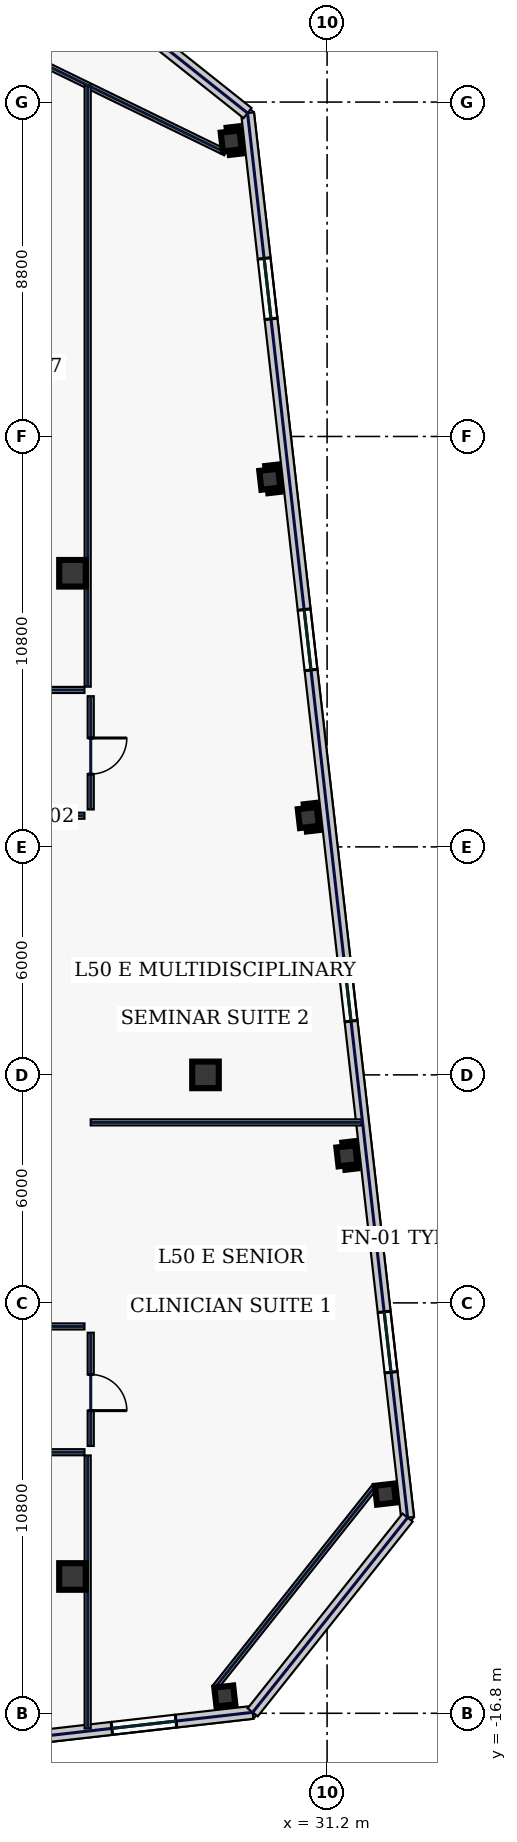
"""IFC4 building model, lengths in metres.
Left out: names, types, materials, properties, quantities, classifications, styles, units other than length and angle.
Written with IfcOpenShell. Run it as: python <this file> out.ifc"""

import sys

from ifc_helpers import new_model, si_unit, direction, frame, frame_2d, origin, origin_2d, place, context, subcontext, project, spatial, rectangle, hollow_rectangle, extrude, element, fill, save


model = new_model("IFC4")
c1 = context("Model", 3, precision=1e-05, world=origin(), true_north=direction((0.0, 1.0)))
c2 = subcontext(c1, "Body", "Model", "MODEL_VIEW")
j1 = project(units=[si_unit("LENGTHUNIT", "METRE"), si_unit("PLANEANGLEUNIT", "RADIAN")], contexts=[c1])
p1 = place(None, origin())
s1 = spatial("IfcSite", under=j1, at=p1, CompositionType="ELEMENT")
p2 = place(p1, origin())
s2 = spatial("IfcBuilding", under=s1, at=p2, CompositionType="ELEMENT")
p3 = place(p2, frame((0.0, 0.0, 218.2)))
s3 = spatial("IfcBuildingStorey", under=s2, at=p3, CompositionType="ELEMENT", Elevation=218.2)
for number, where, z_axis, x_axis in (
    (1, (24.5, -13.2, 0.0), (0.0, 0.0, 1.0), (1.0, 0.0, 0.0)),
    (2, (24.5, 13.2, 0.0), (0.0, 0.0, 1.0), (1.0, 0.0, 0.0)),
    (3, (28.0, 0.0, 0.0), (0.0, 0.0, 1.0), (1.0, 0.0, 0.0)),
):
    element("IfcColumn", number, at=place(p3, frame(where, z_axis=z_axis, x_axis=x_axis)), inside=s3, PredefinedType="COLUMN", context=c2, shape_type="SweptSolid", body=[
        extrude(hollow_rectangle(XDim=0.7, YDim=0.7, WallThickness=0.032, at=origin_2d()), origin(), (0.0, 0.0, 1.0), 3.74),
    ])
for number, where, z_axis, x_axis in (
    (4, (28.509, -16.345, 0.0), (0.0, 0.0, 1.0), (0.994, 0.113, 0.0)),
    (5, (32.734, -11.033, 0.0), (0.0, 0.0, 1.0), (0.994, 0.113, 0.0)),
    (6, (31.72, -2.131, 0.0), (0.0, 0.0, 1.0), (0.994, 0.113, 0.0)),
    (7, (30.706, 6.772, 0.0), (0.0, 0.0, 1.0), (0.994, 0.113, 0.0)),
    (8, (29.691, 15.674, 0.0), (0.0, 0.0, 1.0), (0.994, 0.113, 0.0)),
    (9, (28.677, 24.577, 0.0), (0.0, 0.0, 1.0), (0.994, 0.113, 0.0)),
):
    element("IfcColumn", number, at=place(p3, frame(where, z_axis=z_axis, x_axis=x_axis)), inside=s3, PredefinedType="COLUMN", context=c2, shape_type="SweptSolid", body=[
        extrude(hollow_rectangle(XDim=0.5, YDim=0.5, WallThickness=0.025, at=origin_2d()), origin(), (0.0, 0.0, 1.0), 3.74),
    ])
p4 = place(p3, frame((10.71, -18.886, 0.0), z_axis=(0.0, 0.0, 1.0), x_axis=(0.993572271362, 0.113199565282, 0.0)))
e10 = element("IfcWall", 10, at=p4, inside=s3, PredefinedType="STANDARD", context=c2, shape_type="SweptSolid", body=[
    extrude(rectangle(XDim=18.651, YDim=0.34, at=frame_2d((9.326, 0.0))), origin(), (0.0, 0.0, 1.0), 3.74),
])
p5 = place(p4, frame((3.024, 0.0, 0.88)))
e11 = element("IfcOpeningElement", 11, at=p5, cuts=e10, PredefinedType="OPENING", context=c2, shape_type="SweptSolid", body=[
    extrude(rectangle(XDim=1.7, YDim=1.95, at=frame_2d((0.85, 0.975))), frame((0.0, 0.18, 0.0), z_axis=(0.0, -1.0, 0.0), x_axis=(1.0, 0.0, 0.0)), (0.0, 0.0, 1.0), 0.36),
])
p6 = place(p4, frame((6.773, 0.0, 0.88)))
e12 = element("IfcOpeningElement", 12, at=p6, cuts=e10, PredefinedType="OPENING", context=c2, shape_type="SweptSolid", body=[
    extrude(rectangle(XDim=1.7, YDim=1.95, at=frame_2d((0.85, 0.975))), frame((0.0, 0.18, 0.0), z_axis=(0.0, -1.0, 0.0), x_axis=(1.0, 0.0, 0.0)), (0.0, 0.0, 1.0), 0.36),
])
p7 = place(p4, frame((11.173, 0.0, 0.88)))
e13 = element("IfcOpeningElement", 13, at=p7, cuts=e10, PredefinedType="OPENING", context=c2, shape_type="SweptSolid", body=[
    extrude(rectangle(XDim=1.7, YDim=1.95, at=frame_2d((0.85, 0.975))), frame((0.0, 0.18, 0.0), z_axis=(0.0, -1.0, 0.0), x_axis=(1.0, 0.0, 0.0)), (0.0, 0.0, 1.0), 0.36),
])
p8 = place(p4, frame((14.921, 0.0, 0.88)))
e14 = element("IfcOpeningElement", 14, at=p8, cuts=e10, PredefinedType="OPENING", context=c2, shape_type="SweptSolid", body=[
    extrude(rectangle(XDim=1.7, YDim=1.95, at=frame_2d((0.85, 0.975))), frame((0.0, 0.18, 0.0), z_axis=(0.0, -1.0, 0.0), x_axis=(1.0, 0.0, 0.0)), (0.0, 0.0, 1.0), 0.36),
])
p9 = place(p3, frame((33.318, -11.651, 0.0), z_axis=(0.0, 0.0, 1.0), x_axis=(-0.11320360501, 0.9935718111, 0.0)))
e15 = element("IfcWall", 15, at=p9, inside=s3, PredefinedType="STANDARD", context=c2, shape_type="SweptSolid", body=[
    extrude(rectangle(XDim=37.2, YDim=0.34, at=frame_2d((18.6, 0.0))), origin(), (0.0, 0.0, 1.0), 3.74),
])
p10 = place(p9, frame((3.85, 0.0, 0.58)))
e16 = element("IfcOpeningElement", 16, at=p10, cuts=e15, PredefinedType="OPENING", context=c2, shape_type="SweptSolid", body=[
    extrude(rectangle(XDim=1.6, YDim=2.3, at=frame_2d((0.8, 1.15))), frame((0.0, 0.18, 0.0), z_axis=(0.0, -1.0, 0.0), x_axis=(1.0, 0.0, 0.0)), (0.0, 0.0, 1.0), 0.36),
])
p11 = place(p9, frame((13.15, 0.0, 0.58)))
e17 = element("IfcOpeningElement", 17, at=p11, cuts=e15, PredefinedType="OPENING", context=c2, shape_type="SweptSolid", body=[
    extrude(rectangle(XDim=1.6, YDim=2.3, at=frame_2d((0.8, 1.15))), frame((0.0, 0.18, 0.0), z_axis=(0.0, -1.0, 0.0), x_axis=(1.0, 0.0, 0.0)), (0.0, 0.0, 1.0), 0.36),
])
p12 = place(p9, frame((22.45, 0.0, 0.58)))
e18 = element("IfcOpeningElement", 18, at=p12, cuts=e15, PredefinedType="OPENING", context=c2, shape_type="SweptSolid", body=[
    extrude(rectangle(XDim=1.6, YDim=2.3, at=frame_2d((0.8, 1.15))), frame((0.0, 0.18, 0.0), z_axis=(0.0, -1.0, 0.0), x_axis=(1.0, 0.0, 0.0)), (0.0, 0.0, 1.0), 0.36),
])
p13 = place(p9, frame((31.75, 0.0, 0.58)))
e19 = element("IfcOpeningElement", 19, at=p13, cuts=e15, PredefinedType="OPENING", context=c2, shape_type="SweptSolid", body=[
    extrude(rectangle(XDim=1.6, YDim=2.3, at=frame_2d((0.8, 1.15))), frame((0.0, 0.18, 0.0), z_axis=(0.0, -1.0, 0.0), x_axis=(1.0, 0.0, 0.0)), (0.0, 0.0, 1.0), 0.36),
])
for number, where, z_axis, x_axis in (
    (20, (29.242, -16.775, 0.0), (0.0, 0.0, 1.0), (0.623, 0.783, 0.0)),
    (21, (29.107, 25.31, 0.0), (0.0, 0.0, 1.0), (-0.783, 0.623, 0.0)),
):
    element("IfcWall", number, at=place(p3, frame(where, z_axis=z_axis, x_axis=x_axis)), inside=s3, PredefinedType="STANDARD", context=c2, shape_type="SweptSolid", body=[
        extrude(rectangle(XDim=6.548, YDim=0.34, at=frame_2d((3.274, 0.0))), origin(), (0.0, 0.0, 1.0), 3.74),
    ])
p14 = place(p3, frame((28.242, -16.134, 0.0), z_axis=(0.0, 0.0, 1.0), x_axis=(0.622521563328, 0.782602647064, 0.0)))
e22 = element("IfcWall", 22, at=p14, inside=s3, PredefinedType="PARTITIONING", context=c2, shape_type="SweptSolid", body=[
    extrude(rectangle(XDim=6.788, YDim=0.16, at=frame_2d((3.394, 0.0))), origin(), (0.0, 0.0, 1.0), 3.74),
])
p15 = place(p3, frame((28.528, 24.271, 0.0), z_axis=(0.0, 0.0, 1.0), x_axis=(-0.898820692789, 0.438316509173, 0.0)))
e23 = element("IfcWall", 23, at=p15, inside=s3, PredefinedType="PARTITIONING", context=c2, shape_type="SweptSolid", body=[
    extrude(rectangle(XDim=6.107, YDim=0.16, at=frame_2d((3.053, 0.0))), origin(), (0.0, 0.0, 1.0), 3.74),
])
p16 = place(p3, frame((-24.815, 10.13, 0.0), z_axis=(0.0, 0.0, 1.0), x_axis=(1.0, 0.0, 0.0)))
e24 = element("IfcWall", 24, at=p16, inside=s3, PredefinedType="PARTITIONING", context=c2, shape_type="SweptSolid", body=[
    extrude(rectangle(XDim=49.63, YDim=0.16, at=frame_2d((24.815, 0.0))), origin(), (0.0, 0.0, 1.0), 3.74),
])
p17 = place(p16, frame((2.819, 0.0, 0.0)))
e25 = element("IfcOpeningElement", 25, at=p17, cuts=e24, PredefinedType="OPENING", context=c2, shape_type="SweptSolid", body=[
    extrude(rectangle(XDim=0.95, YDim=2.2, at=frame_2d((0.475, 1.1))), frame((0.0, 0.09, 0.0), z_axis=(0.0, -1.0, 0.0), x_axis=(1.0, 0.0, 0.0)), (0.0, 0.0, 1.0), 0.18),
])
p18 = place(p16, frame((8.375, 0.0, 0.0)))
e26 = element("IfcOpeningElement", 26, at=p18, cuts=e24, PredefinedType="OPENING", context=c2, shape_type="SweptSolid", body=[
    extrude(rectangle(XDim=0.95, YDim=2.2, at=frame_2d((0.475, 1.1))), frame((0.0, 0.09, 0.0), z_axis=(0.0, -1.0, 0.0), x_axis=(1.0, 0.0, 0.0)), (0.0, 0.0, 1.0), 0.18),
])
p19 = place(p16, frame((18.15, 0.0, 0.0)))
e27 = element("IfcOpeningElement", 27, at=p19, cuts=e24, PredefinedType="OPENING", context=c2, shape_type="SweptSolid", body=[
    extrude(rectangle(XDim=1.15, YDim=2.2, at=frame_2d((0.575, 1.1))), frame((0.0, 0.09, 0.0), z_axis=(0.0, -1.0, 0.0), x_axis=(1.0, 0.0, 0.0)), (0.0, 0.0, 1.0), 0.18),
])
p20 = place(p16, frame((31.95, 0.0, 0.0)))
e28 = element("IfcOpeningElement", 28, at=p20, cuts=e24, PredefinedType="OPENING", context=c2, shape_type="SweptSolid", body=[
    extrude(rectangle(XDim=0.95, YDim=2.2, at=frame_2d((0.475, 1.1))), frame((0.0, 0.09, 0.0), z_axis=(0.0, -1.0, 0.0), x_axis=(1.0, 0.0, 0.0)), (0.0, 0.0, 1.0), 0.18),
])
p21 = place(p16, frame((41.525, 0.0, 0.0)))
e29 = element("IfcOpeningElement", 29, at=p21, cuts=e24, PredefinedType="OPENING", context=c2, shape_type="SweptSolid", body=[
    extrude(rectangle(XDim=1.05, YDim=2.2, at=frame_2d((0.525, 1.1))), frame((0.0, 0.09, 0.0), z_axis=(0.0, -1.0, 0.0), x_axis=(1.0, 0.0, 0.0)), (0.0, 0.0, 1.0), 0.18),
])
p22 = place(p16, frame((46.681, 0.0, 0.0)))
e30 = element("IfcOpeningElement", 30, at=p22, cuts=e24, PredefinedType="OPENING", context=c2, shape_type="SweptSolid", body=[
    extrude(rectangle(XDim=0.95, YDim=2.2, at=frame_2d((0.475, 1.1))), frame((0.0, 0.09, 0.0), z_axis=(0.0, -1.0, 0.0), x_axis=(1.0, 0.0, 0.0)), (0.0, 0.0, 1.0), 0.18),
])
p23 = place(p3, frame((24.98, 9.965, 0.0), z_axis=(0.0, 0.0, 1.0), x_axis=(0.0, -1.0, 0.0)))
e31 = element("IfcWall", 31, at=p23, inside=s3, PredefinedType="PARTITIONING", context=c2, shape_type="SweptSolid", body=[
    extrude(rectangle(XDim=2.98, YDim=0.16, at=frame_2d((1.49, 0.0))), origin(), (0.0, 0.0, 1.0), 3.74),
])
p24 = place(p23, frame((1.1, 0.0, 0.0)))
e32 = element("IfcOpeningElement", 32, at=p24, cuts=e31, PredefinedType="OPENING", context=c2, shape_type="SweptSolid", body=[
    extrude(rectangle(XDim=0.95, YDim=2.2, at=frame_2d((0.475, 1.1))), frame((0.0, 0.09, 0.0), z_axis=(0.0, -1.0, 0.0), x_axis=(1.0, 0.0, 0.0)), (0.0, 0.0, 1.0), 0.18),
])
for number, where, z_axis, x_axis in (
    (33, (24.815, 6.82, 0.0), (0.0, 0.0, 1.0), (-1.0, 0.0, 0.0)),
    (34, (10.63, -6.62, 0.0), (0.0, 0.0, 1.0), (1.0, 0.0, 0.0)),
):
    element("IfcWall", number, at=place(p3, frame(where, z_axis=z_axis, x_axis=x_axis)), inside=s3, PredefinedType="PARTITIONING", context=c2, shape_type="SweptSolid", body=[
        extrude(rectangle(XDim=14.185, YDim=0.16, at=frame_2d((7.093, 0.0))), origin(), (0.0, 0.0, 1.0), 3.74),
    ])
p25 = place(p3, frame((24.98, -6.785, 0.0), z_axis=(0.0, 0.0, 1.0), x_axis=(0.0, -1.0, 0.0)))
e35 = element("IfcWall", 35, at=p25, inside=s3, PredefinedType="PARTITIONING", context=c2, shape_type="SweptSolid", body=[
    extrude(rectangle(XDim=2.98, YDim=0.16, at=frame_2d((1.49, 0.0))), origin(), (0.0, 0.0, 1.0), 3.74),
])
p26 = place(p25, frame((1.1, 0.0, 0.0)))
e36 = element("IfcOpeningElement", 36, at=p26, cuts=e35, PredefinedType="OPENING", context=c2, shape_type="SweptSolid", body=[
    extrude(rectangle(XDim=0.95, YDim=2.2, at=frame_2d((0.475, 1.1))), frame((0.0, 0.09, 0.0), z_axis=(0.0, -1.0, 0.0), x_axis=(1.0, 0.0, 0.0)), (0.0, 0.0, 1.0), 0.18),
])
p27 = place(p3, frame((24.815, -9.93, 0.0), z_axis=(0.0, 0.0, 1.0), x_axis=(-1.0, 0.0, 0.0)))
e37 = element("IfcWall", 37, at=p27, inside=s3, PredefinedType="PARTITIONING", context=c2, shape_type="SweptSolid", body=[
    extrude(rectangle(XDim=49.63, YDim=0.16, at=frame_2d((24.815, 0.0))), origin(), (0.0, 0.0, 1.0), 3.74),
])
p28 = place(p27, frame((46.806, 0.0, 0.0)))
e38 = element("IfcOpeningElement", 38, at=p28, cuts=e37, PredefinedType="OPENING", context=c2, shape_type="SweptSolid", body=[
    extrude(rectangle(XDim=0.95, YDim=2.2, at=frame_2d((0.475, 1.1))), frame((0.0, 0.09, 0.0), z_axis=(0.0, -1.0, 0.0), x_axis=(1.0, 0.0, 0.0)), (0.0, 0.0, 1.0), 0.18),
])
p29 = place(p27, frame((42.65, 0.0, 0.0)))
e39 = element("IfcOpeningElement", 39, at=p29, cuts=e37, PredefinedType="OPENING", context=c2, shape_type="SweptSolid", body=[
    extrude(rectangle(XDim=0.95, YDim=2.2, at=frame_2d((0.475, 1.1))), frame((0.0, 0.09, 0.0), z_axis=(0.0, -1.0, 0.0), x_axis=(1.0, 0.0, 0.0)), (0.0, 0.0, 1.0), 0.18),
])
p30 = place(p27, frame((34.02, 0.0, 0.0)))
e40 = element("IfcOpeningElement", 40, at=p30, cuts=e37, PredefinedType="OPENING", context=c2, shape_type="SweptSolid", body=[
    extrude(rectangle(XDim=0.95, YDim=2.2, at=frame_2d((0.475, 1.1))), frame((0.0, 0.09, 0.0), z_axis=(0.0, -1.0, 0.0), x_axis=(1.0, 0.0, 0.0)), (0.0, 0.0, 1.0), 0.18),
])
p31 = place(p27, frame((27.14, 0.0, 0.0)))
e41 = element("IfcOpeningElement", 41, at=p31, cuts=e37, PredefinedType="OPENING", context=c2, shape_type="SweptSolid", body=[
    extrude(rectangle(XDim=1.05, YDim=2.2, at=frame_2d((0.525, 1.1))), frame((0.0, 0.09, 0.0), z_axis=(0.0, -1.0, 0.0), x_axis=(1.0, 0.0, 0.0)), (0.0, 0.0, 1.0), 0.18),
])
p32 = place(p27, frame((19.925, 0.0, 0.0)))
e42 = element("IfcOpeningElement", 42, at=p32, cuts=e37, PredefinedType="OPENING", context=c2, shape_type="SweptSolid", body=[
    extrude(rectangle(XDim=0.95, YDim=2.2, at=frame_2d((0.475, 1.1))), frame((0.0, 0.09, 0.0), z_axis=(0.0, -1.0, 0.0), x_axis=(1.0, 0.0, 0.0)), (0.0, 0.0, 1.0), 0.18),
])
p33 = place(p27, frame((11.625, 0.0, 0.0)))
e43 = element("IfcOpeningElement", 43, at=p33, cuts=e37, PredefinedType="OPENING", context=c2, shape_type="SweptSolid", body=[
    extrude(rectangle(XDim=0.95, YDim=2.2, at=frame_2d((0.475, 1.1))), frame((0.0, 0.09, 0.0), z_axis=(0.0, -1.0, 0.0), x_axis=(1.0, 0.0, 0.0)), (0.0, 0.0, 1.0), 0.18),
])
p34 = place(p27, frame((3.769, 0.0, 0.0)))
e44 = element("IfcOpeningElement", 44, at=p34, cuts=e37, PredefinedType="OPENING", context=c2, shape_type="SweptSolid", body=[
    extrude(rectangle(XDim=0.95, YDim=2.2, at=frame_2d((0.475, 1.1))), frame((0.0, 0.09, 0.0), z_axis=(0.0, -1.0, 0.0), x_axis=(1.0, 0.0, 0.0)), (0.0, 0.0, 1.0), 0.18),
])
p35 = place(p3, frame((24.9, 10.215, 0.0), z_axis=(0.0, 0.0, 1.0), x_axis=(0.0, 1.0, 0.0)))
e45 = element("IfcWall", 45, at=p35, inside=s3, PredefinedType="PARTITIONING", context=c2, shape_type="SweptSolid", body=[
    extrude(rectangle(XDim=15.829, YDim=0.16, at=frame_2d((7.915, 0.0))), origin(), (0.0, 0.0, 1.0), 3.74),
])
p36 = place(p3, frame((24.9, -17.199, 0.0), z_axis=(0.0, 0.0, 1.0), x_axis=(0.0, 1.0, 0.0)))
e46 = element("IfcWall", 46, at=p36, inside=s3, PredefinedType="PARTITIONING", context=c2, shape_type="SweptSolid", body=[
    extrude(rectangle(XDim=7.185, YDim=0.16, at=frame_2d((3.592, 0.0))), origin(), (0.0, 0.0, 1.0), 3.74),
])
p37 = place(p3, frame((24.98, -1.25, 0.0), z_axis=(0.0, 0.0, 1.0), x_axis=(1.0, 0.0, 0.0)))
e47 = element("IfcWall", 47, at=p37, inside=s3, PredefinedType="PARTITIONING", context=c2, shape_type="SweptSolid", body=[
    extrude(rectangle(XDim=7.133, YDim=0.16, at=frame_2d((3.566, 0.0))), origin(), (0.0, 0.0, 1.0), 3.74),
])
p38 = place(p8, origin())
e48 = element("IfcWindow", 48, at=p38, inside=s3, PartitioningType="SINGLE_PANEL", PredefinedType="WINDOW", context=c2, shape_type="SweptSolid", body=[
    extrude(rectangle(XDim=1.7, YDim=1.95, at=frame_2d((0.85, 0.975))), frame((0.0, 0.03, 0.0), z_axis=(0.0, -1.0, 0.0), x_axis=(1.0, 0.0, 0.0)), (0.0, 0.0, 1.0), 0.06),
])
fill(e14, e48)
p39 = place(p10, origin())
e49 = element("IfcWindow", 49, at=p39, inside=s3, PartitioningType="SINGLE_PANEL", PredefinedType="WINDOW", context=c2, shape_type="SweptSolid", body=[
    extrude(rectangle(XDim=1.6, YDim=2.3, at=frame_2d((0.8, 1.15))), frame((0.0, 0.03, 0.0), z_axis=(0.0, -1.0, 0.0), x_axis=(1.0, 0.0, 0.0)), (0.0, 0.0, 1.0), 0.06),
])
fill(e16, e49)
p40 = place(p11, origin())
e50 = element("IfcWindow", 50, at=p40, inside=s3, PartitioningType="SINGLE_PANEL", PredefinedType="WINDOW", context=c2, shape_type="SweptSolid", body=[
    extrude(rectangle(XDim=1.6, YDim=2.3, at=frame_2d((0.8, 1.15))), frame((0.0, 0.03, 0.0), z_axis=(0.0, -1.0, 0.0), x_axis=(1.0, 0.0, 0.0)), (0.0, 0.0, 1.0), 0.06),
])
fill(e17, e50)
p41 = place(p12, origin())
e51 = element("IfcWindow", 51, at=p41, inside=s3, PartitioningType="SINGLE_PANEL", PredefinedType="WINDOW", context=c2, shape_type="SweptSolid", body=[
    extrude(rectangle(XDim=1.6, YDim=2.3, at=frame_2d((0.8, 1.15))), frame((0.0, 0.03, 0.0), z_axis=(0.0, -1.0, 0.0), x_axis=(1.0, 0.0, 0.0)), (0.0, 0.0, 1.0), 0.06),
])
fill(e18, e51)
p42 = place(p13, origin())
e52 = element("IfcWindow", 52, at=p42, inside=s3, PartitioningType="SINGLE_PANEL", PredefinedType="WINDOW", context=c2, shape_type="SweptSolid", body=[
    extrude(rectangle(XDim=1.6, YDim=2.3, at=frame_2d((0.8, 1.15))), frame((0.0, 0.03, 0.0), z_axis=(0.0, -1.0, 0.0), x_axis=(1.0, 0.0, 0.0)), (0.0, 0.0, 1.0), 0.06),
])
fill(e19, e52)
p43 = place(p26, origin())
e53 = element("IfcDoor", 53, at=p43, inside=s3, OperationType="SINGLE_SWING_RIGHT", PredefinedType="DOOR", context=c2, shape_type="SweptSolid", body=[
    extrude(rectangle(XDim=0.95, YDim=2.2, at=frame_2d((0.475, 1.1))), frame((0.0, 0.025, 0.0), z_axis=(0.0, -1.0, 0.0), x_axis=(1.0, 0.0, 0.0)), (0.0, 0.0, 1.0), 0.05),
])
fill(e36, e53)
p44 = place(p24, origin())
e54 = element("IfcDoor", 54, at=p44, inside=s3, OperationType="SINGLE_SWING_LEFT", PredefinedType="DOOR", context=c2, shape_type="SweptSolid", body=[
    extrude(rectangle(XDim=0.95, YDim=2.2, at=frame_2d((0.475, 1.1))), frame((0.0, 0.025, 0.0), z_axis=(0.0, -1.0, 0.0), x_axis=(1.0, 0.0, 0.0)), (0.0, 0.0, 1.0), 0.05),
])
fill(e32, e54)
save(model, sys.argv[1])
